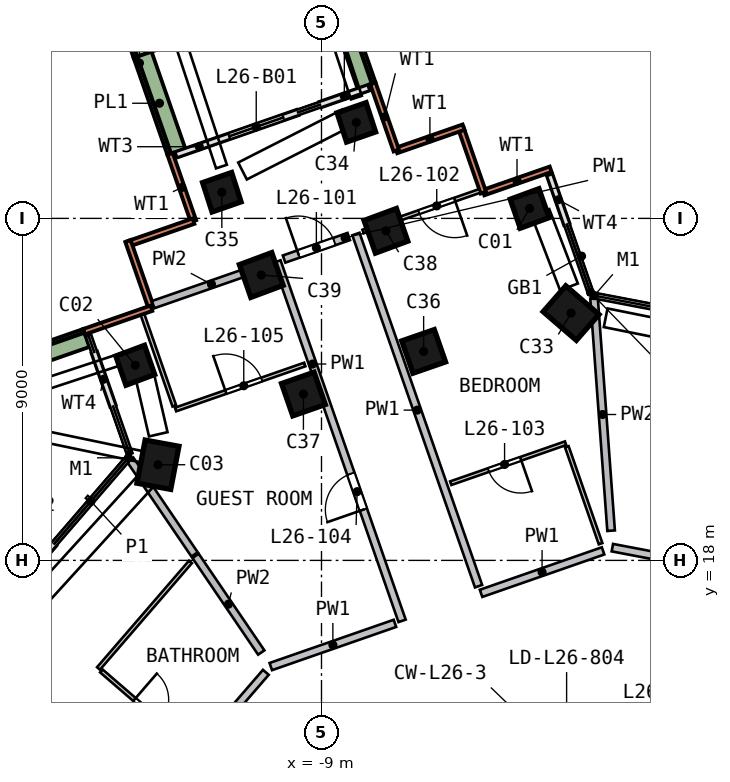
"""IFC4 building model, lengths in metres.
Left out: names, types, materials, properties, quantities, classifications, styles, units other than length and angle.
Written with IfcOpenShell. Run it as: python <this file> out.ifc"""

import sys

from ifc_helpers import new_model, si_unit, direction, frame, frame_2d, origin, origin_2d, place, context, subcontext, project, spatial, rectangle, extrude, element, fill, save


model = new_model("IFC4")
c1 = context("Model", 3, precision=1e-05, world=origin(), true_north=direction((0.0, 1.0)))
c2 = subcontext(c1, "Body", "Model", "MODEL_VIEW")
j1 = project(units=[si_unit("LENGTHUNIT", "METRE"), si_unit("PLANEANGLEUNIT", "RADIAN")], contexts=[c1])
p1 = place(None, origin())
s1 = spatial("IfcSite", under=j1, at=p1, CompositionType="ELEMENT")
p2 = place(p1, origin())
s2 = spatial("IfcBuilding", under=s1, at=p2, CompositionType="ELEMENT")
p3 = place(p2, frame((0.0, 0.0, 111.5)))
s3 = spatial("IfcBuildingStorey", under=s2, at=p3, CompositionType="ELEMENT", Elevation=111.5)
p4 = place(p3, frame((-3.432, 27.46, 0.0), z_axis=(-0.075511583, -0.16329474, 0.983683297), x_axis=(-0.341654715, 0.931023333, 0.128326185)))
e1 = element("IfcColumn", 1, at=p4, inside=s3, PredefinedType="COLUMN", context=c2, shape_type="SweptSolid", body=[
    extrude(rectangle(XDim=0.8, YDim=0.8, at=origin_2d()), origin(), (0.0, 0.0, 1.0), 3.243),
])
p5 = place(p3, frame((-13.833, 23.393, 0.0), z_axis=(-0.055576676, -0.210429429, 0.976028016), x_axis=(0.344400072, -0.921584845, -0.179080886)))
e2 = element("IfcColumn", 2, at=p5, inside=s3, PredefinedType="COLUMN", context=c2, shape_type="SweptSolid", body=[
    extrude(rectangle(XDim=0.8, YDim=0.8, at=origin_2d()), origin(), (0.0, 0.0, 1.0), 3.268),
])
p6 = place(p3, frame((-13.186, 20.594, 0.0), z_axis=(-0.097375682, -0.063548845, 0.993216754), x_axis=(0.179806408, 0.98041432, 0.080358058)))
e3 = element("IfcColumn", 3, at=p6, inside=s3, PredefinedType="COLUMN", context=c2, shape_type="SweptSolid", body=[
    extrude(rectangle(XDim=1.15, YDim=0.9, at=origin_2d()), origin(), (0.0, 0.0, 1.0), 3.212),
])
p7 = place(p3, frame((-2.292, 24.522, 0.0), z_axis=(-0.116519812, -0.01193321, 0.993116676), x_axis=(0.750371365, -0.656138694, 0.080155023)))
e4 = element("IfcColumn", 4, at=p7, inside=s3, PredefinedType="COLUMN", context=c2, shape_type="SweptSolid", body=[
    extrude(rectangle(XDim=1.15, YDim=0.9, at=origin_2d()), origin(), (0.0, 0.0, 1.0), 3.212),
])
p8 = place(p3, frame((-7.979, 29.752, 0.0), z_axis=(-0.085732912, -0.183981031, 0.979183766), x_axis=(-0.94165413, -0.306101902, -0.139961158)))
e5 = element("IfcColumn", 5, at=p8, inside=s3, PredefinedType="COLUMN", context=c2, shape_type="SweptSolid", body=[
    extrude(rectangle(XDim=0.8, YDim=0.8, at=origin_2d()), origin(), (0.0, 0.0, 1.0), 3.258),
])
p9 = place(p3, frame((-11.528, 27.934, 0.0), z_axis=(-0.076923927, -0.200047064, 0.976761937), x_axis=(-0.942809555, -0.304088616, -0.136529326)))
e6 = element("IfcColumn", 6, at=p9, inside=s3, PredefinedType="COLUMN", context=c2, shape_type="SweptSolid", body=[
    extrude(rectangle(XDim=0.8, YDim=0.8, at=origin_2d()), origin(), (0.0, 0.0, 1.0), 3.266),
])
for number, where, z_axis, x_axis in (
    (7, (-6.177, 23.536, 0.0), (-0.112, -0.03, 0.993), (-0.328, 0.945, -0.008)),
    (8, (-9.347, 22.432, 0.0), (-0.106, -0.045, 0.993), (-0.33, 0.944, 0.008)),
):
    element("IfcColumn", number, at=place(p3, frame(where, z_axis=z_axis, x_axis=x_axis)), inside=s3, PredefinedType="COLUMN", context=c2, shape_type="SweptSolid", body=[
        extrude(rectangle(XDim=0.9, YDim=0.9, at=origin_2d()), origin(), (0.0, 0.0, 1.0), 3.211),
    ])
p10 = place(p3, frame((-7.216, 26.894, 0.0), z_axis=(-0.072518446, -0.180620477, 0.980875791), x_axis=(-0.343313691, 0.927885269, 0.145480708)))
e9 = element("IfcColumn", 9, at=p10, inside=s3, PredefinedType="COLUMN", context=c2, shape_type="SweptSolid", body=[
    extrude(rectangle(XDim=0.9, YDim=0.9, at=origin_2d()), origin(), (0.0, 0.0, 1.0), 3.252),
])
p11 = place(p3, frame((-10.502, 25.75, 0.0), z_axis=(-0.06687026, -0.195518756, 0.97841749), x_axis=(-0.34431051, 0.924897425, 0.161291741)))
e10 = element("IfcColumn", 10, at=p11, inside=s3, PredefinedType="COLUMN", context=c2, shape_type="SweptSolid", body=[
    extrude(rectangle(XDim=0.9, YDim=0.9, at=origin_2d()), origin(), (0.0, 0.0, 1.0), 3.26),
])
p12 = place(p3, frame((-2.97, 28.293, 0.0), z_axis=(0.0, 0.0, 1.0), x_axis=(-0.944366739, -0.328894303, 0.0)))
e11 = element("IfcWall", 11, at=p12, inside=s3, PredefinedType="SOLIDWALL", context=c2, shape_type="SweptSolid", body=[
    extrude(rectangle(XDim=1.875, YDim=0.15, at=frame_2d((0.938, 0.0))), origin(), (0.0, 0.0, 1.0), 3.19),
])
p13 = place(p3, frame((-4.741, 27.677, 0.0), z_axis=(0.0, 0.0, 1.0), x_axis=(-0.328773123, 0.944408933, 0.0)))
e12 = element("IfcWall", 12, at=p13, inside=s3, PredefinedType="SOLIDWALL", context=c2, shape_type="SweptSolid", body=[
    extrude(rectangle(XDim=1.8, YDim=0.15, at=frame_2d((0.9, 0.0))), origin(), (0.0, 0.0, 1.0), 3.19),
])
for number, where, z_axis, x_axis in (
    (13, (-5.262, 29.401, 0.0), (0.0, 0.0, 1.0), (-0.944, -0.329, 0.0)),
    (14, (-7.032, 28.785, 0.0), (0.0, 0.0, 1.0), (-0.329, 0.944, 0.0)),
    (15, (-12.985, 28.697, 0.0), (0.0, 0.0, 1.0), (0.329, -0.944, 0.0)),
):
    element("IfcWall", number, at=place(p3, frame(where, z_axis=z_axis, x_axis=x_axis)), inside=s3, PredefinedType="SOLIDWALL", context=c2, shape_type="SweptSolid", body=[
        extrude(rectangle(XDim=1.875, YDim=0.15, at=frame_2d((0.938, 0.0))), origin(), (0.0, 0.0, 1.0), 3.19),
    ])
p14 = place(p3, frame((-12.368, 26.927, 0.0), z_axis=(0.0, 0.0, 1.0), x_axis=(-0.944366814, -0.328894087, 0.0)))
e16 = element("IfcWall", 16, at=p14, inside=s3, PredefinedType="SOLIDWALL", context=c2, shape_type="SweptSolid", body=[
    extrude(rectangle(XDim=1.8, YDim=0.15, at=frame_2d((0.9, 0.0))), origin(), (0.0, 0.0, 1.0), 3.19),
])
for number, where, z_axis, x_axis in (
    (17, (-14.093, 26.406, 0.0), (0.0, 0.0, 1.0), (0.329, -0.944, 0.0)),
    (18, (-13.476, 24.635, 0.0), (0.0, 0.0, 1.0), (-0.944, -0.329, 0.0)),
):
    element("IfcWall", number, at=place(p3, frame(where, z_axis=z_axis, x_axis=x_axis)), inside=s3, PredefinedType="SOLIDWALL", context=c2, shape_type="SweptSolid", body=[
        extrude(rectangle(XDim=1.875, YDim=0.15, at=frame_2d((0.938, 0.0))), origin(), (0.0, 0.0, 1.0), 3.19),
    ])
p15 = place(p3, frame((-2.546, 26.848, 0.0), z_axis=(0.0, 0.0, 1.0), x_axis=(-0.328966326, 0.944341652, 0.0)))
e19 = element("IfcWall", 19, at=p15, inside=s3, PredefinedType="SOLIDWALL", context=c2, shape_type="SweptSolid", body=[
    extrude(rectangle(XDim=1.36, YDim=0.15, at=frame_2d((0.68, 0.0))), origin(), (0.0, 0.0, 1.0), 2.425),
])
p16 = place(p3, frame((-9.631, 29.786, 0.0), z_axis=(0.0, 0.0, 1.0), x_axis=(-0.944382384, -0.328849378, 0.0)))
e20 = element("IfcWall", 20, at=p16, inside=s3, PredefinedType="SOLIDWALL", context=c2, shape_type="SweptSolid", body=[
    extrude(rectangle(XDim=3.37, YDim=0.15, at=frame_2d((1.685, 0.0))), origin(), (0.0, 0.0, 1.0), 2.425),
])
p17 = place(p16, frame((0.4, 0.0, 0.0)))
e21 = element("IfcOpeningElement", 21, at=p17, cuts=e20, PredefinedType="OPENING", context=c2, shape_type="SweptSolid", body=[
    extrude(rectangle(XDim=1.5, YDim=2.4, at=frame_2d((0.75, 1.2))), frame((0.0, 0.085, 0.0), z_axis=(0.0, -1.0, 0.0), x_axis=(1.0, 0.0, 0.0)), (0.0, 0.0, 1.0), 0.17),
])
p18 = place(p3, frame((-7.771, 30.434, 0.0), z_axis=(0.0, 0.0, 1.0), x_axis=(-0.944380444, -0.32885495, 0.0)))
e22 = element("IfcWall", 22, at=p18, inside=s3, PredefinedType="SOLIDWALL", context=c2, shape_type="SweptSolid", body=[
    extrude(rectangle(XDim=1.331, YDim=0.15, at=frame_2d((0.666, 0.0))), origin(), (0.0, 0.0, 1.0), 2.425),
])
p19 = place(p3, frame((-14.977, 23.471, 0.0), z_axis=(0.0, 0.0, 1.0), x_axis=(0.328882879, -0.944370718, 0.0)))
e23 = element("IfcWall", 23, at=p19, inside=s3, PredefinedType="SOLIDWALL", context=c2, shape_type="SweptSolid", body=[
    extrude(rectangle(XDim=1.49, YDim=0.15, at=frame_2d((0.745, 0.0))), origin(), (0.0, 0.0, 1.0), 2.425),
])
p20 = place(p3, frame((-16.036, 18.432, 0.0), z_axis=(0.0, 0.0, 1.0), x_axis=(-0.653425946, -0.756990445, 0.0)))
e24 = element("IfcWall", 24, at=p20, inside=s3, PredefinedType="SOLIDWALL", context=c2, shape_type="SweptSolid", body=[
    extrude(rectangle(XDim=3.475, YDim=0.15, at=frame_2d((1.737, 0.0))), origin(), (0.0, 0.0, 1.0), 2.425),
])
p21 = place(p20, frame((0.4, 0.0, 0.0)))
e25 = element("IfcOpeningElement", 25, at=p21, cuts=e24, PredefinedType="OPENING", context=c2, shape_type="SweptSolid", body=[
    extrude(rectangle(XDim=2.4, YDim=2.4, at=frame_2d((1.2, 1.2))), frame((0.0, 0.085, 0.0), z_axis=(0.0, -1.0, 0.0), x_axis=(1.0, 0.0, 0.0)), (0.0, 0.0, 1.0), 0.17),
])
p22 = place(p3, frame((-7.815, 30.499, 0.0), z_axis=(0.0, 0.0, 1.0), x_axis=(-0.328861017, 0.944378331, 0.0)))
e26 = element("IfcWall", 26, at=p22, inside=s3, PredefinedType="SOLIDWALL", context=c2, shape_type="SweptSolid", body=[
    extrude(rectangle(XDim=3.199, YDim=0.5, at=frame_2d((1.6, 0.0))), origin(), (0.0, 0.0, 1.0), 0.7),
])
p23 = place(p3, frame((-9.021, 33.201, 0.0), z_axis=(0.0, 0.0, 1.0), x_axis=(-0.944384264, -0.328843979, 0.0)))
e27 = element("IfcWall", 27, at=p23, inside=s3, PredefinedType="SOLIDWALL", context=c2, shape_type="SweptSolid", body=[
    extrude(rectangle(XDim=5.3, YDim=0.5, at=frame_2d((2.65, 0.0))), origin(), (0.0, 0.0, 1.0), 0.7),
])
p24 = place(p3, frame((-13.708, 31.305, 0.0), z_axis=(0.0, 0.0, 1.0), x_axis=(0.328899509, -0.944364926, 0.0)))
e28 = element("IfcWall", 28, at=p24, inside=s3, PredefinedType="SOLIDWALL", context=c2, shape_type="SweptSolid", body=[
    extrude(rectangle(XDim=2.699, YDim=0.5, at=frame_2d((1.35, 0.0))), origin(), (0.0, 0.0, 1.0), 0.7),
])
p25 = place(p3, frame((-15.19, 23.853, 0.0), z_axis=(0.0, 0.0, 1.0), x_axis=(-0.944378331, -0.328861017, 0.0)))
e29 = element("IfcWall", 29, at=p25, inside=s3, PredefinedType="SOLIDWALL", context=c2, shape_type="SweptSolid", body=[
    extrude(rectangle(XDim=3.199, YDim=0.5, at=frame_2d((1.6, 0.0))), origin(), (0.0, 0.0, 1.0), 0.7),
])
p26 = place(p3, frame((-16.552, 8.002, 0.0), z_axis=(0.0, 0.0, 1.0), x_axis=(0.653409696, 0.757004471, 0.0)))
e30 = element("IfcWall", 30, at=p26, inside=s3, PredefinedType="SOLIDWALL", context=c2, shape_type="SweptSolid", body=[
    extrude(rectangle(XDim=9.316, YDim=0.2, at=frame_2d((4.658, 0.0))), origin(), (0.0, 0.0, 1.0), 3.19),
])
p27 = place(p26, frame((5.15, 0.0, 0.0)))
e31 = element("IfcOpeningElement", 31, at=p27, cuts=e30, PredefinedType="OPENING", context=c2, shape_type="SweptSolid", body=[
    extrude(rectangle(XDim=1.0, YDim=2.1, at=frame_2d((0.5, 1.05))), frame((0.0, 0.11, 0.0), z_axis=(0.0, -1.0, 0.0), x_axis=(1.0, 0.0, 0.0)), (0.0, 0.0, 1.0), 0.22),
])
p28 = place(p3, frame((-9.985, 25.93, 0.0), z_axis=(0.0, 0.0, 1.0), x_axis=(0.944385241, 0.328841173, 0.0)))
e32 = element("IfcWall", 32, at=p28, inside=s3, PredefinedType="SOLIDWALL", context=c2, shape_type="SweptSolid", body=[
    extrude(rectangle(XDim=1.802, YDim=0.2, at=frame_2d((0.901, 0.0))), origin(), (0.0, 0.0, 1.0), 3.19),
])
p29 = place(p28, frame((0.4, 0.0, 0.0)))
e33 = element("IfcOpeningElement", 33, at=p29, cuts=e32, PredefinedType="OPENING", context=c2, shape_type="SweptSolid", body=[
    extrude(rectangle(XDim=1.0, YDim=2.1, at=frame_2d((0.5, 1.05))), frame((0.0, 0.11, 0.0), z_axis=(0.0, -1.0, 0.0), x_axis=(1.0, 0.0, 0.0)), (0.0, 0.0, 1.0), 0.22),
])
p30 = place(p3, frame((-7.068, 16.343, 0.0), z_axis=(0.0, 0.0, 1.0), x_axis=(-0.944384357, -0.328843712, 0.0)))
e34 = element("IfcWall", 34, at=p30, inside=s3, PredefinedType="SOLIDWALL", context=c2, shape_type="SweptSolid", body=[
    extrude(rectangle(XDim=3.458, YDim=0.2, at=frame_2d((1.729, 0.0))), origin(), (0.0, 0.0, 1.0), 3.19),
])
p31 = place(p3, frame((-6.879, 16.409, 0.0), z_axis=(0.0, 0.0, 1.0), x_axis=(-0.328868616, 0.944375684, 0.0)))
e35 = element("IfcWall", 35, at=p31, inside=s3, PredefinedType="SOLIDWALL", context=c2, shape_type="SweptSolid", body=[
    extrude(rectangle(XDim=10.013, YDim=0.2, at=frame_2d((5.006, 0.0))), origin(), (0.0, 0.0, 1.0), 3.19),
])
p32 = place(p31, frame((3.1, 0.0, 0.0)))
e36 = element("IfcOpeningElement", 36, at=p32, cuts=e35, PredefinedType="OPENING", context=c2, shape_type="SweptSolid", body=[
    extrude(rectangle(XDim=1.0, YDim=2.1, at=frame_2d((0.5, 1.05))), frame((0.0, 0.11, 0.0), z_axis=(0.0, -1.0, 0.0), x_axis=(1.0, 0.0, 0.0)), (0.0, 0.0, 1.0), 0.22),
])
p33 = place(p3, frame((-4.867, 17.321, 0.0), z_axis=(0.0, 0.0, 1.0), x_axis=(-0.328858345, 0.944379261, 0.0)))
e37 = element("IfcWall", 37, at=p33, inside=s3, PredefinedType="SOLIDWALL", context=c2, shape_type="SweptSolid", body=[
    extrude(rectangle(XDim=9.813, YDim=0.2, at=frame_2d((4.906, 0.0))), origin(), (0.0, 0.0, 1.0), 3.19),
])
p34 = place(p3, frame((-1.59, 18.25, 0.0), z_axis=(0.0, 0.0, 1.0), x_axis=(-0.944376615, -0.328865944, 0.0)))
e38 = element("IfcWall", 38, at=p34, inside=s3, PredefinedType="SOLIDWALL", context=c2, shape_type="SweptSolid", body=[
    extrude(rectangle(XDim=3.4, YDim=0.2, at=frame_2d((1.7, 0.0))), origin(), (0.0, 0.0, 1.0), 3.19),
])
p35 = place(p3, frame((8.001, 16.552, 0.0), z_axis=(0.0, 0.0, 1.0), x_axis=(-0.982286432, 0.187385606, 0.0)))
e39 = element("IfcWall", 39, at=p35, inside=s3, PredefinedType="SOLIDWALL", context=c2, shape_type="SweptSolid", body=[
    extrude(rectangle(XDim=9.516, YDim=0.2, at=frame_2d((4.758, 0.0))), origin(), (0.0, 0.0, 1.0), 3.19),
])
p36 = place(p3, frame((-12.339, 18.156, 0.0), z_axis=(0.0, 0.0, 1.0), x_axis=(-0.562123746, 0.827053138, 0.0)))
e40 = element("IfcWall", 40, at=p36, inside=s3, PredefinedType="SOLIDWALL", context=c2, shape_type="SweptSolid", body=[
    extrude(rectangle(XDim=3.011, YDim=0.2, at=frame_2d((1.506, 0.0))), origin(), (0.0, 0.0, 1.0), 3.19),
])
p37 = place(p3, frame((-10.359, 25.8, 0.0), z_axis=(0.0, 0.0, 1.0), x_axis=(-0.944364041, -0.328902048, 0.0)))
e41 = element("IfcWall", 41, at=p37, inside=s3, PredefinedType="SOLIDWALL", context=c2, shape_type="SweptSolid", body=[
    extrude(rectangle(XDim=3.252, YDim=0.2, at=frame_2d((1.626, 0.0))), origin(), (0.0, 0.0, 1.0), 3.19),
])
p38 = place(p3, frame((-10.585, 15.576, 0.0), z_axis=(0.0, 0.0, 1.0), x_axis=(-0.562099331, 0.827069732, 0.0)))
e42 = element("IfcWall", 42, at=p38, inside=s3, PredefinedType="SOLIDWALL", context=c2, shape_type="SweptSolid", body=[
    extrude(rectangle(XDim=3.075, YDim=0.2, at=frame_2d((1.537, 0.0))), origin(), (0.0, 0.0, 1.0), 3.19),
])
p39 = place(p3, frame((-1.828, 24.897, 0.0), z_axis=(0.0, 0.0, 1.0), x_axis=(0.073258648, -0.997312975, 0.0)))
e43 = element("IfcWall", 43, at=p39, inside=s3, PredefinedType="SOLIDWALL", context=c2, shape_type="SweptSolid", body=[
    extrude(rectangle(XDim=6.132, YDim=0.2, at=frame_2d((3.066, 0.0))), origin(), (0.0, 0.0, 1.0), 3.19),
])
p40 = place(p3, frame((-14.868, 15.156, 0.0), z_axis=(0.0, 0.0, 1.0), x_axis=(0.653436238, 0.756981561, 0.0)))
e44 = element("IfcWall", 44, at=p40, inside=s3, PredefinedType="PARTITIONING", context=c2, shape_type="SweptSolid", body=[
    extrude(rectangle(XDim=3.704, YDim=0.1, at=frame_2d((1.852, 0.0))), origin(), (0.0, 0.0, 1.0), 3.19),
])
p41 = place(p3, frame((-14.792, 15.091, 0.0), z_axis=(0.0, 0.0, 1.0), x_axis=(0.75698944, -0.65342711, 0.0)))
e45 = element("IfcWall", 45, at=p41, inside=s3, PredefinedType="PARTITIONING", context=c2, shape_type="SweptSolid", body=[
    extrude(rectangle(XDim=3.1, YDim=0.1, at=frame_2d((1.55, 0.0))), origin(), (0.0, 0.0, 1.0), 3.19),
])
p42 = place(p41, frame((1.15, 0.0, 0.0)))
e46 = element("IfcOpeningElement", 46, at=p42, cuts=e45, PredefinedType="OPENING", context=c2, shape_type="SweptSolid", body=[
    extrude(rectangle(XDim=0.9, YDim=2.1, at=frame_2d((0.45, 1.05))), frame((0.0, 0.06, 0.0), z_axis=(0.0, -1.0, 0.0), x_axis=(1.0, 0.0, 0.0)), (0.0, 0.0, 1.0), 0.12),
])
p43 = place(p3, frame((-12.873, 22.065, 0.0), z_axis=(0.0, 0.0, 1.0), x_axis=(-0.328865944, 0.944376615, 0.0)))
e47 = element("IfcWall", 47, at=p43, inside=s3, PredefinedType="PARTITIONING", context=c2, shape_type="SweptSolid", body=[
    extrude(rectangle(XDim=2.55, YDim=0.1, at=frame_2d((1.275, 0.0))), origin(), (0.0, 0.0, 1.0), 3.19),
])
p44 = place(p3, frame((-12.84, 21.971, 0.0), z_axis=(0.0, 0.0, 1.0), x_axis=(0.944359478, 0.32891515, 0.0)))
e48 = element("IfcWall", 48, at=p44, inside=s3, PredefinedType="PARTITIONING", context=c2, shape_type="SweptSolid", body=[
    extrude(rectangle(XDim=3.6, YDim=0.1, at=frame_2d((1.8, 0.0))), origin(), (0.0, 0.0, 1.0), 3.19),
])
p45 = place(p44, frame((1.4, 0.0, 0.0)))
e49 = element("IfcOpeningElement", 49, at=p45, cuts=e48, PredefinedType="OPENING", context=c2, shape_type="SweptSolid", body=[
    extrude(rectangle(XDim=1.0, YDim=2.1, at=frame_2d((0.5, 1.05))), frame((0.0, 0.06, 0.0), z_axis=(0.0, -1.0, 0.0), x_axis=(1.0, 0.0, 0.0)), (0.0, 0.0, 1.0), 0.12),
])
p46 = place(p3, frame((-4.834, 27.723, 0.0), z_axis=(0.0, 0.0, 1.0), x_axis=(-0.944395475, -0.328811779, 0.0)))
e50 = element("IfcWall", 50, at=p46, inside=s3, PredefinedType="PARTITIONING", context=c2, shape_type="SweptSolid", body=[
    extrude(rectangle(XDim=3.252, YDim=0.1, at=frame_2d((1.626, 0.0))), origin(), (0.0, 0.0, 1.0), 3.19),
])
p47 = place(p46, frame((0.7, 0.0, 0.0)))
e51 = element("IfcOpeningElement", 51, at=p47, cuts=e50, PredefinedType="OPENING", context=c2, shape_type="SweptSolid", body=[
    extrude(rectangle(XDim=1.0, YDim=2.1, at=frame_2d((0.5, 1.05))), frame((0.0, 0.06, 0.0), z_axis=(0.0, -1.0, 0.0), x_axis=(1.0, 0.0, 0.0)), (0.0, 0.0, 1.0), 0.12),
])
p48 = place(p3, frame((-2.577, 21.083, 0.0), z_axis=(0.0, 0.0, 1.0), x_axis=(-0.94439589, -0.328810589, 0.0)))
e52 = element("IfcWall", 52, at=p48, inside=s3, PredefinedType="PARTITIONING", context=c2, shape_type="SweptSolid", body=[
    extrude(rectangle(XDim=3.2, YDim=0.1, at=frame_2d((1.6, 0.0))), origin(), (0.0, 0.0, 1.0), 3.19),
])
p49 = place(p48, frame((1.25, 0.0, 0.0)))
e53 = element("IfcOpeningElement", 53, at=p49, cuts=e52, PredefinedType="OPENING", context=c2, shape_type="SweptSolid", body=[
    extrude(rectangle(XDim=0.9, YDim=2.1, at=frame_2d((0.45, 1.05))), frame((0.0, 0.06, 0.0), z_axis=(0.0, -1.0, 0.0), x_axis=(1.0, 0.0, 0.0)), (0.0, 0.0, 1.0), 0.12),
])
p50 = place(p3, frame((-1.656, 18.439, 0.0), z_axis=(0.0, 0.0, 1.0), x_axis=(-0.328867808, 0.944375966, 0.0)))
e54 = element("IfcWall", 54, at=p50, inside=s3, PredefinedType="PARTITIONING", context=c2, shape_type="SweptSolid", body=[
    extrude(rectangle(XDim=2.7, YDim=0.1, at=frame_2d((1.35, 0.0))), origin(), (0.0, 0.0, 1.0), 3.19),
])
p51 = place(p17, origin())
e55 = element("IfcDoor", 55, at=p51, inside=s3, OperationType="SLIDING_TO_RIGHT", PredefinedType="DOOR", context=c2, shape_type="SweptSolid", body=[
    extrude(rectangle(XDim=1.5, YDim=2.4, at=frame_2d((0.75, 1.2))), frame((0.0, 0.025, 0.0), z_axis=(0.0, -1.0, 0.0), x_axis=(1.0, 0.0, 0.0)), (0.0, 0.0, 1.0), 0.05),
])
fill(e21, e55)
p52 = place(p29, origin())
e56 = element("IfcDoor", 56, at=p52, inside=s3, OperationType="SINGLE_SWING_LEFT", PredefinedType="DOOR", context=c2, shape_type="SweptSolid", body=[
    extrude(rectangle(XDim=1.0, YDim=2.1, at=frame_2d((0.5, 1.05))), frame((0.0, 0.025, 0.0), z_axis=(0.0, -1.0, 0.0), x_axis=(1.0, 0.0, 0.0)), (0.0, 0.0, 1.0), 0.05),
])
fill(e33, e56)
p53 = place(p47, origin())
e57 = element("IfcDoor", 57, at=p53, inside=s3, OperationType="SINGLE_SWING_LEFT", PredefinedType="DOOR", context=c2, shape_type="SweptSolid", body=[
    extrude(rectangle(XDim=1.0, YDim=2.1, at=frame_2d((0.5, 1.05))), frame((0.0, 0.025, 0.0), z_axis=(0.0, -1.0, 0.0), x_axis=(1.0, 0.0, 0.0)), (0.0, 0.0, 1.0), 0.05),
])
fill(e51, e57)
p54 = place(p49, origin())
e58 = element("IfcDoor", 58, at=p54, inside=s3, OperationType="SINGLE_SWING_LEFT", PredefinedType="DOOR", context=c2, shape_type="SweptSolid", body=[
    extrude(rectangle(XDim=0.9, YDim=2.1, at=frame_2d((0.45, 1.05))), frame((0.0, 0.025, 0.0), z_axis=(0.0, -1.0, 0.0), x_axis=(1.0, 0.0, 0.0)), (0.0, 0.0, 1.0), 0.05),
])
fill(e53, e58)
p55 = place(p32, origin())
e59 = element("IfcDoor", 59, at=p55, inside=s3, OperationType="SINGLE_SWING_LEFT", PredefinedType="DOOR", context=c2, shape_type="SweptSolid", body=[
    extrude(rectangle(XDim=1.0, YDim=2.1, at=frame_2d((0.5, 1.05))), frame((0.0, 0.025, 0.0), z_axis=(0.0, -1.0, 0.0), x_axis=(1.0, 0.0, 0.0)), (0.0, 0.0, 1.0), 0.05),
])
fill(e36, e59)
p56 = place(p45, origin())
e60 = element("IfcDoor", 60, at=p56, inside=s3, OperationType="SINGLE_SWING_LEFT", PredefinedType="DOOR", context=c2, shape_type="SweptSolid", body=[
    extrude(rectangle(XDim=1.0, YDim=2.1, at=frame_2d((0.5, 1.05))), frame((0.0, 0.025, 0.0), z_axis=(0.0, -1.0, 0.0), x_axis=(1.0, 0.0, 0.0)), (0.0, 0.0, 1.0), 0.05),
])
fill(e49, e60)
p57 = place(p42, origin())
e61 = element("IfcDoor", 61, at=p57, inside=s3, OperationType="SINGLE_SWING_LEFT", PredefinedType="DOOR", context=c2, shape_type="SweptSolid", body=[
    extrude(rectangle(XDim=0.9, YDim=2.1, at=frame_2d((0.45, 1.05))), frame((0.0, 0.025, 0.0), z_axis=(0.0, -1.0, 0.0), x_axis=(1.0, 0.0, 0.0)), (0.0, 0.0, 1.0), 0.05),
])
fill(e46, e61)
save(model, sys.argv[1])
